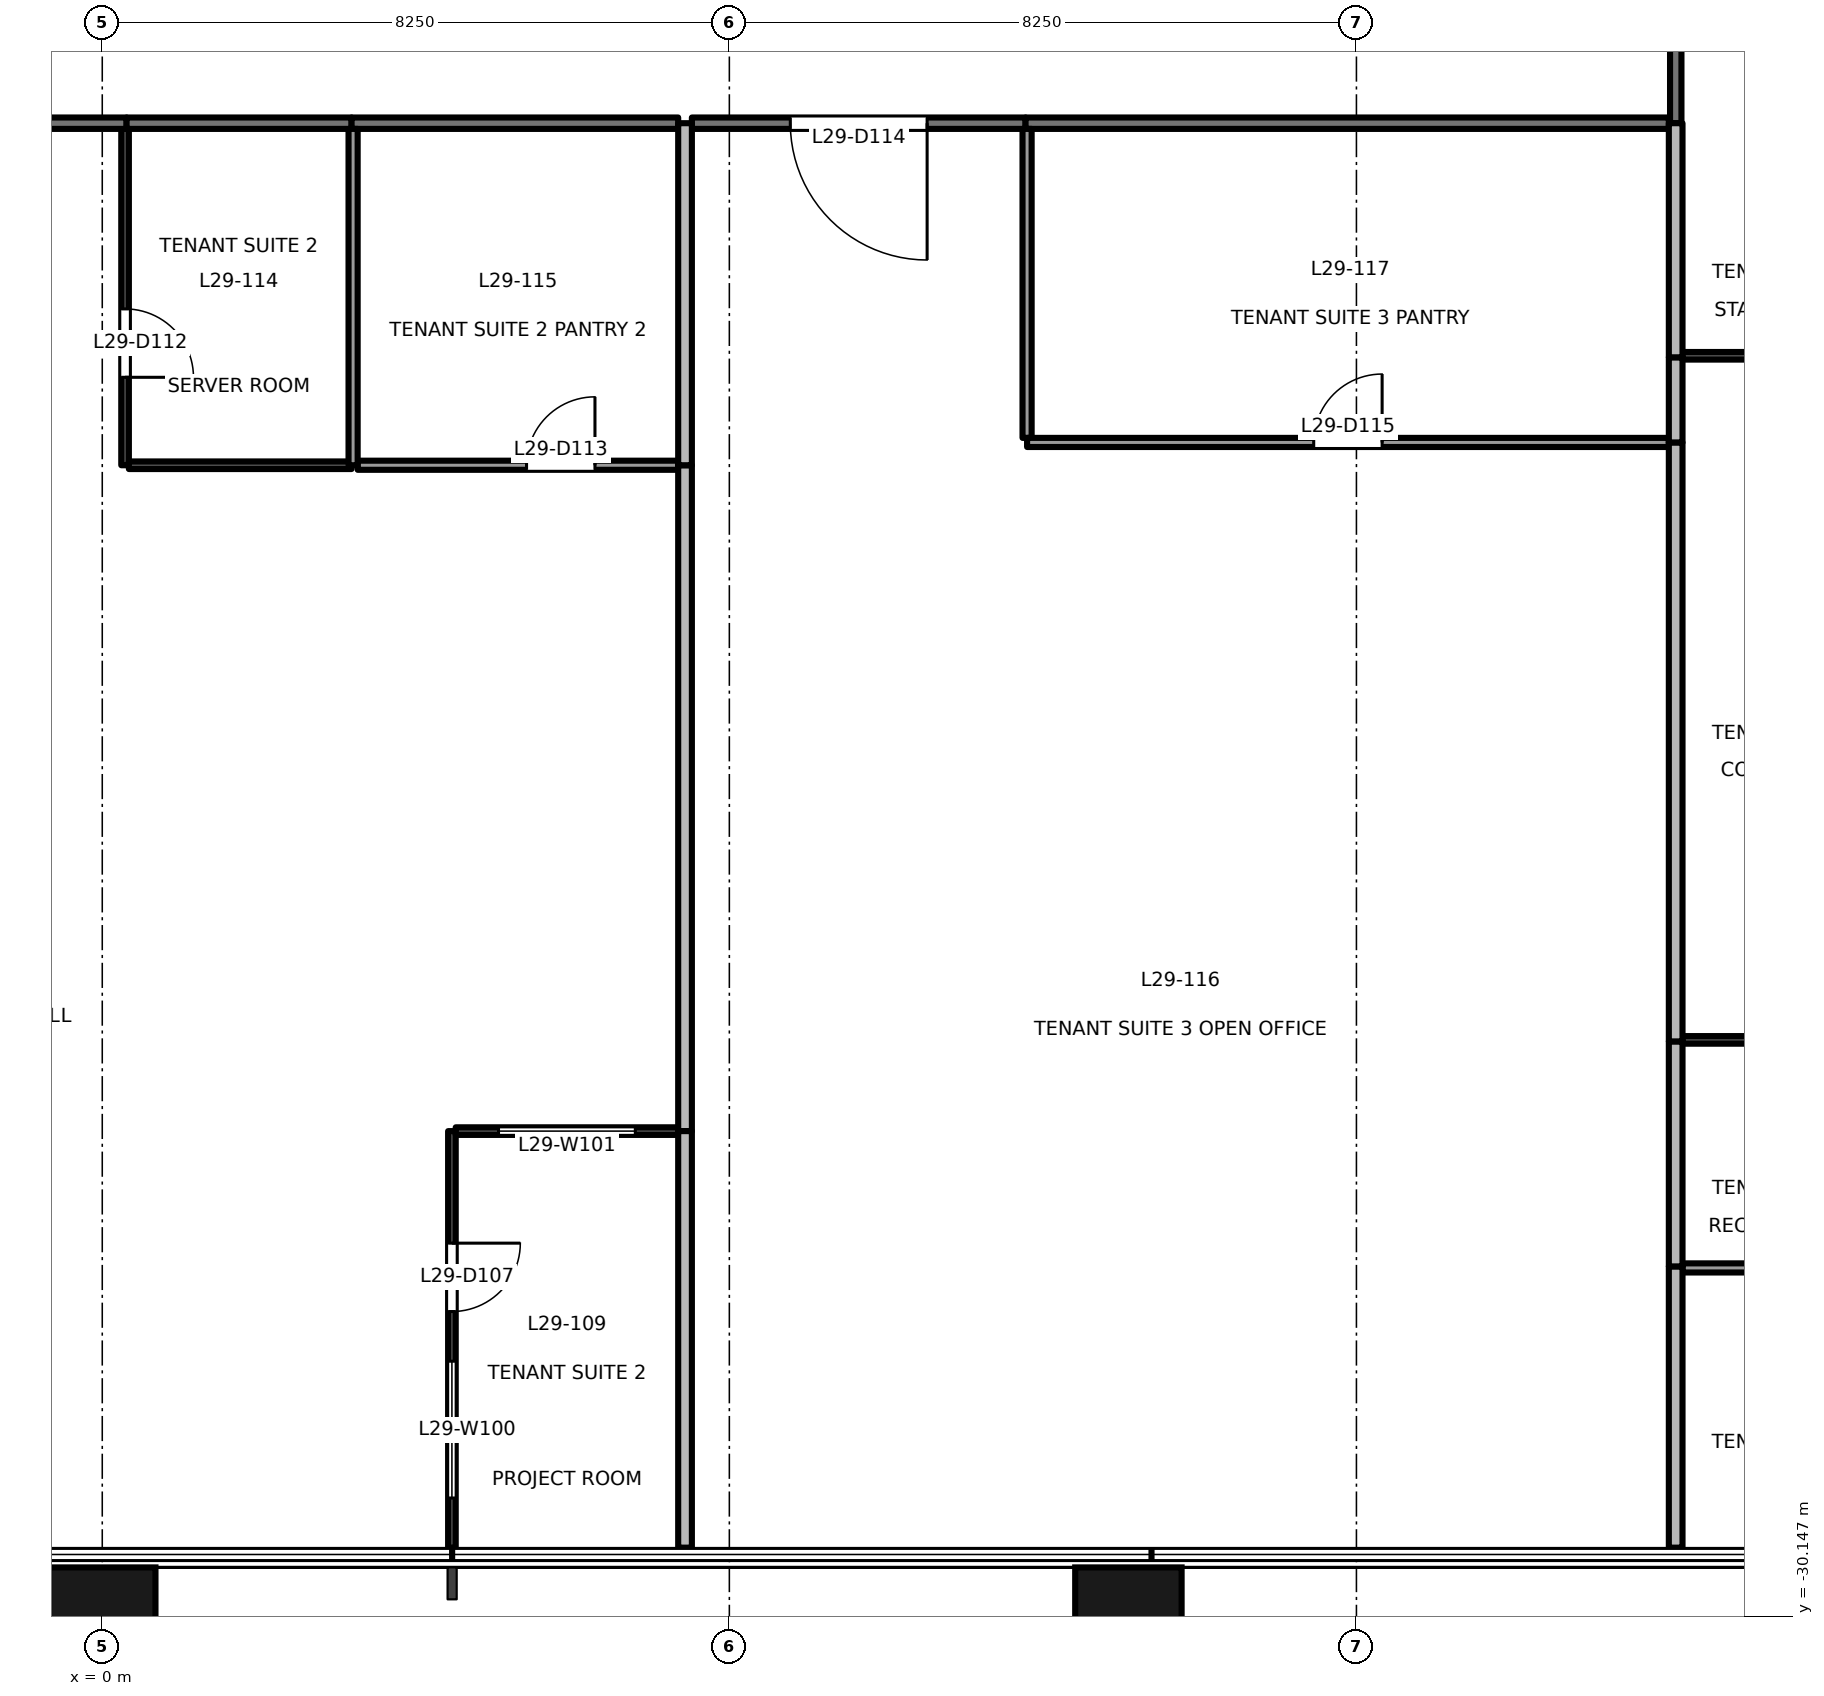
"""IFC4 building model, lengths in metres.
Left out: names, types, materials, properties, quantities, classifications, styles, units other than length and angle.
Written with IfcOpenShell. Run it as: python <this file> out.ifc"""

import sys

from ifc_helpers import new_model, si_unit, direction, frame, frame_2d, origin, origin_2d, place, context, subcontext, project, spatial, rectangle, extrude, element, fill, save


model = new_model("IFC4")
c1 = context("Model", 3, precision=1e-05, world=origin(), true_north=direction((0.0, 1.0)))
c2 = subcontext(c1, "Body", "Model", "MODEL_VIEW")
j1 = project(units=[si_unit("LENGTHUNIT", "METRE"), si_unit("PLANEANGLEUNIT", "RADIAN")], contexts=[c1])
p1 = place(None, origin())
s1 = spatial("IfcSite", under=j1, at=p1, CompositionType="ELEMENT")
p2 = place(p1, origin())
s2 = spatial("IfcBuilding", under=s1, at=p2, CompositionType="ELEMENT")
p3 = place(p2, frame((0.0, 0.0, 130.1)))
s3 = spatial("IfcBuildingStorey", under=s2, at=p3, CompositionType="ELEMENT", Elevation=130.1)
for number, where, z_axis, x_axis in (
    (1, (0.0, -30.4, -0.2), (0.0, 0.0, 1.0), (1.0, 0.0, 0.0)),
    (2, (13.5, -30.4, -0.2), (0.0, 0.0, 1.0), (1.0, 0.0, 0.0)),
):
    element("IfcColumn", number, at=place(p3, frame(where, z_axis=z_axis, x_axis=x_axis)), inside=s3, PredefinedType="COLUMN", context=c2, shape_type="SweptSolid", body=[
        extrude(rectangle(XDim=1.4, YDim=1.8, at=origin_2d()), origin(), (0.0, 0.0, 1.0), 4.0),
    ])
p4 = place(p3, frame((0.32, -10.5, 0.0), z_axis=(0.0, 0.0, 1.0), x_axis=(-1.0, 0.0, 0.0)))
e3 = element("IfcWall", 3, at=p4, inside=s3, PredefinedType="PARTITIONING", context=c2, shape_type="SweptSolid", body=[
    extrude(rectangle(XDim=6.04, YDim=0.15, at=frame_2d((3.02, 0.0))), origin(), (0.0, 0.0, 1.0), 2.9),
])
p5 = place(p4, frame((2.12, 0.0, 0.0)))
e4 = element("IfcOpeningElement", 4, at=p5, cuts=e3, PredefinedType="OPENING", context=c2, shape_type="SweptSolid", body=[
    extrude(rectangle(XDim=1.8, YDim=2.1, at=frame_2d((0.9, 1.05))), frame((0.0, 0.085, 0.0), z_axis=(0.0, -1.0, 0.0), x_axis=(1.0, 0.0, 0.0)), (0.0, 0.0, 1.0), 0.171),
])
p6 = place(p3, frame((3.28, -10.5, 0.0), z_axis=(0.0, 0.0, 1.0), x_axis=(-1.0, 0.0, 0.0)))
e5 = element("IfcWall", 5, at=p6, inside=s3, PredefinedType="PARTITIONING", context=c2, shape_type="SweptSolid", body=[
    extrude(rectangle(XDim=2.96, YDim=0.15, at=frame_2d((1.48, 0.0))), origin(), (0.0, 0.0, 1.0), 3.8),
])
p7 = place(p3, frame((7.577, -10.5, 0.0), z_axis=(0.0, 0.0, 1.0), x_axis=(-1.0, 0.0, 0.0)))
e6 = element("IfcWall", 6, at=p7, inside=s3, PredefinedType="PARTITIONING", context=c2, shape_type="SweptSolid", body=[
    extrude(rectangle(XDim=4.297, YDim=0.15, at=frame_2d((2.148, 0.0))), origin(), (0.0, 0.0, 1.0), 2.9),
])
p8 = place(p3, frame((12.147, -10.5, 0.0), z_axis=(0.0, 0.0, 1.0), x_axis=(-1.0, 0.0, 0.0)))
e7 = element("IfcWall", 7, at=p8, inside=s3, PredefinedType="PARTITIONING", context=c2, shape_type="SweptSolid", body=[
    extrude(rectangle(XDim=4.39, YDim=0.15, at=frame_2d((2.195, 0.0))), origin(), (0.0, 0.0, 1.0), 2.9),
])
p9 = place(p8, frame((1.295, 0.0, 0.0)))
e8 = element("IfcOpeningElement", 8, at=p9, cuts=e7, PredefinedType="OPENING", context=c2, shape_type="SweptSolid", body=[
    extrude(rectangle(XDim=1.8, YDim=2.1, at=frame_2d((0.9, 1.05))), frame((0.0, 0.085, 0.0), z_axis=(0.0, -1.0, 0.0), x_axis=(1.0, 0.0, 0.0)), (0.0, 0.0, 1.0), 0.171),
])
p10 = place(p3, frame((20.61, -10.5, 0.0), z_axis=(0.0, 0.0, 1.0), x_axis=(-1.0, 0.0, 0.0)))
e9 = element("IfcWall", 9, at=p10, inside=s3, PredefinedType="PARTITIONING", context=c2, shape_type="SweptSolid", body=[
    extrude(rectangle(XDim=8.463, YDim=0.15, at=frame_2d((4.231, 0.0))), origin(), (0.0, 0.0, 1.0), 2.9),
])
p11 = place(p3, frame((20.701, -8.18, 0.0), z_axis=(0.0, 0.0, 1.0), x_axis=(0.0, -1.0, 0.0)))
e10 = element("IfcWall", 10, at=p11, inside=s3, PredefinedType="PARTITIONING", context=c2, shape_type="SweptSolid", body=[
    extrude(rectangle(XDim=2.32, YDim=0.15, at=frame_2d((1.16, 0.0))), origin(), (0.0, 0.0, 1.0), 3.8),
])
p12 = place(p3, frame((4.6, -23.76, 0.0), z_axis=(0.0, 0.0, 1.0), x_axis=(0.0, -1.0, 0.0)))
e11 = element("IfcWall", 11, at=p12, inside=s3, PredefinedType="PARTITIONING", context=c2, shape_type="SweptSolid", body=[
    extrude(rectangle(XDim=5.48, YDim=0.1, at=frame_2d((2.74, 0.0))), origin(), (0.0, 0.0, 1.0), 2.9),
])
p13 = place(p12, frame((1.474, 0.0, 0.0)))
e12 = element("IfcOpeningElement", 12, at=p13, cuts=e11, PredefinedType="OPENING", context=c2, shape_type="SweptSolid", body=[
    extrude(rectangle(XDim=0.9, YDim=2.1, at=frame_2d((0.45, 1.05))), frame((0.0, 0.061, 0.0), z_axis=(0.0, -1.0, 0.0), x_axis=(1.0, 0.0, 0.0)), (0.0, 0.0, 1.0), 0.121),
])
p14 = place(p12, frame((3.027, 0.0, 0.9)))
e13 = element("IfcOpeningElement", 13, at=p14, cuts=e11, PredefinedType="OPENING", context=c2, shape_type="SweptSolid", body=[
    extrude(rectangle(XDim=1.8, YDim=1.2, at=frame_2d((0.9, 0.6))), frame((0.0, 0.061, 0.0), z_axis=(0.0, -1.0, 0.0), x_axis=(1.0, 0.0, 0.0)), (0.0, 0.0, 1.0), 0.121),
])
p15 = place(p3, frame((7.577, -23.76, 0.0), z_axis=(0.0, 0.0, 1.0), x_axis=(-1.0, 0.0, 0.0)))
e14 = element("IfcWall", 14, at=p15, inside=s3, PredefinedType="PARTITIONING", context=c2, shape_type="SweptSolid", body=[
    extrude(rectangle(XDim=2.927, YDim=0.1, at=frame_2d((1.463, 0.0))), origin(), (0.0, 0.0, 1.0), 2.9),
])
p16 = place(p15, frame((0.564, 0.0, 0.9)))
e15 = element("IfcOpeningElement", 15, at=p16, cuts=e14, PredefinedType="OPENING", context=c2, shape_type="SweptSolid", body=[
    extrude(rectangle(XDim=1.8, YDim=1.2, at=frame_2d((0.9, 0.6))), frame((0.0, 0.061, 0.0), z_axis=(0.0, -1.0, 0.0), x_axis=(1.0, 0.0, 0.0)), (0.0, 0.0, 1.0), 0.121),
])
p17 = place(p3, frame((0.3, -10.575, 0.0), z_axis=(0.0, 0.0, 1.0), x_axis=(0.0, -1.0, 0.0)))
e16 = element("IfcWall", 16, at=p17, inside=s3, PredefinedType="PARTITIONING", context=c2, shape_type="SweptSolid", body=[
    extrude(rectangle(XDim=4.425, YDim=0.1, at=frame_2d((2.212, 0.0))), origin(), (0.0, 0.0, 1.0), 3.8),
])
p18 = place(p17, frame((2.368, 0.0, 0.0)))
e17 = element("IfcOpeningElement", 17, at=p18, cuts=e16, PredefinedType="OPENING", context=c2, shape_type="SweptSolid", body=[
    extrude(rectangle(XDim=0.9, YDim=2.1, at=frame_2d((0.45, 1.05))), frame((0.0, 0.061, 0.0), z_axis=(0.0, -1.0, 0.0), x_axis=(1.0, 0.0, 0.0)), (0.0, 0.0, 1.0), 0.121),
])
p19 = place(p3, frame((0.35, -15.0, 0.0), z_axis=(0.0, 0.0, 1.0), x_axis=(1.0, 0.0, 0.0)))
e18 = element("IfcWall", 18, at=p19, inside=s3, PredefinedType="PARTITIONING", context=c2, shape_type="SweptSolid", body=[
    extrude(rectangle(XDim=2.93, YDim=0.1, at=frame_2d((1.465, 0.0))), origin(), (0.0, 0.0, 1.0), 3.8),
])
p20 = place(p3, frame((3.36, -15.0, 0.0), z_axis=(0.0, 0.0, 1.0), x_axis=(1.0, 0.0, 0.0)))
e19 = element("IfcWall", 19, at=p20, inside=s3, PredefinedType="PARTITIONING", context=c2, shape_type="SweptSolid", body=[
    extrude(rectangle(XDim=4.217, YDim=0.12, at=frame_2d((2.108, 0.0))), origin(), (0.0, 0.0, 1.0), 2.9),
])
p21 = place(p20, frame((2.222, 0.0, 0.0)))
e20 = element("IfcOpeningElement", 20, at=p21, cuts=e19, PredefinedType="OPENING", context=c2, shape_type="SweptSolid", body=[
    extrude(rectangle(XDim=0.9, YDim=2.1, at=frame_2d((0.45, 1.05))), frame((0.0, 0.071, 0.0), z_axis=(0.0, -1.0, 0.0), x_axis=(1.0, 0.0, 0.0)), (0.0, 0.0, 1.0), 0.141),
])
p22 = place(p3, frame((7.667, -15.0, 0.0), z_axis=(0.0, 0.0, 1.0), x_axis=(0.0, -1.0, 0.0)))
e21 = element("IfcWall", 21, at=p22, inside=s3, PredefinedType="PARTITIONING", context=c2, shape_type="SweptSolid", body=[
    extrude(rectangle(XDim=8.76, YDim=0.18, at=frame_2d((4.38, 0.0))), origin(), (0.0, 0.0, 1.0), 3.8),
])
p23 = place(p3, frame((7.667, -23.76, 0.0), z_axis=(0.0, 0.0, 1.0), x_axis=(0.0, -1.0, 0.0)))
e22 = element("IfcWall", 22, at=p23, inside=s3, PredefinedType="PARTITIONING", context=c2, shape_type="SweptSolid", body=[
    extrude(rectangle(XDim=5.48, YDim=0.18, at=frame_2d((2.74, 0.0))), origin(), (0.0, 0.0, 1.0), 3.8),
])
p24 = place(p3, frame((3.3, -10.575, 0.0), z_axis=(0.0, 0.0, 1.0), x_axis=(0.0, -1.0, 0.0)))
e23 = element("IfcWall", 23, at=p24, inside=s3, PredefinedType="PARTITIONING", context=c2, shape_type="SweptSolid", body=[
    extrude(rectangle(XDim=4.425, YDim=0.12, at=frame_2d((2.212, 0.0))), origin(), (0.0, 0.0, 1.0), 3.8),
])
p25 = place(p3, frame((7.667, -10.5, 0.0), z_axis=(0.0, 0.0, 1.0), x_axis=(0.0, -1.0, 0.0)))
e24 = element("IfcWall", 24, at=p25, inside=s3, PredefinedType="PARTITIONING", context=c2, shape_type="SweptSolid", body=[
    extrude(rectangle(XDim=4.5, YDim=0.18, at=frame_2d((2.25, 0.0))), origin(), (0.0, 0.0, 1.0), 3.8),
])
p26 = place(p3, frame((12.167, -10.575, 0.0), z_axis=(0.0, 0.0, 1.0), x_axis=(0.0, -1.0, 0.0)))
e25 = element("IfcWall", 25, at=p26, inside=s3, PredefinedType="PARTITIONING", context=c2, shape_type="SweptSolid", body=[
    extrude(rectangle(XDim=4.065, YDim=0.12, at=frame_2d((2.032, 0.0))), origin(), (0.0, 0.0, 1.0), 3.8),
])
p27 = place(p3, frame((12.167, -14.7, 0.0), z_axis=(0.0, 0.0, 1.0), x_axis=(1.0, 0.0, 0.0)))
e26 = element("IfcWall", 26, at=p27, inside=s3, PredefinedType="PARTITIONING", context=c2, shape_type="SweptSolid", body=[
    extrude(rectangle(XDim=8.443, YDim=0.12, at=frame_2d((4.222, 0.0))), origin(), (0.0, 0.0, 1.0), 2.9),
])
p28 = place(p27, frame((3.771, 0.0, 0.0)))
e27 = element("IfcOpeningElement", 27, at=p28, cuts=e26, PredefinedType="OPENING", context=c2, shape_type="SweptSolid", body=[
    extrude(rectangle(XDim=0.9, YDim=2.1, at=frame_2d((0.45, 1.05))), frame((0.0, 0.071, 0.0), z_axis=(0.0, -1.0, 0.0), x_axis=(1.0, 0.0, 0.0)), (0.0, 0.0, 1.0), 0.141),
])
p29 = place(p3, frame((20.7, -25.54, 0.0), z_axis=(0.0, 0.0, 1.0), x_axis=(0.0, -1.0, 0.0)))
e28 = element("IfcWall", 28, at=p29, inside=s3, PredefinedType="PARTITIONING", context=c2, shape_type="SweptSolid", body=[
    extrude(rectangle(XDim=3.7, YDim=0.18, at=frame_2d((1.85, 0.0))), origin(), (0.0, 0.0, 1.0), 3.8),
])
p30 = place(p3, frame((20.7, -22.58, 0.0), z_axis=(0.0, 0.0, 1.0), x_axis=(0.0, -1.0, 0.0)))
e29 = element("IfcWall", 29, at=p30, inside=s3, PredefinedType="PARTITIONING", context=c2, shape_type="SweptSolid", body=[
    extrude(rectangle(XDim=2.96, YDim=0.18, at=frame_2d((1.48, 0.0))), origin(), (0.0, 0.0, 1.0), 3.8),
])
p31 = place(p3, frame((20.7, -14.7, 0.0), z_axis=(0.0, 0.0, 1.0), x_axis=(0.0, -1.0, 0.0)))
e30 = element("IfcWall", 30, at=p31, inside=s3, PredefinedType="PARTITIONING", context=c2, shape_type="SweptSolid", body=[
    extrude(rectangle(XDim=7.88, YDim=0.18, at=frame_2d((3.94, 0.0))), origin(), (0.0, 0.0, 1.0), 3.8),
])
p32 = place(p3, frame((20.7, -13.58, 0.0), z_axis=(0.0, 0.0, 1.0), x_axis=(0.0, -1.0, 0.0)))
e31 = element("IfcWall", 31, at=p32, inside=s3, PredefinedType="PARTITIONING", context=c2, shape_type="SweptSolid", body=[
    extrude(rectangle(XDim=1.12, YDim=0.18, at=frame_2d((0.56, 0.0))), origin(), (0.0, 0.0, 1.0), 3.8),
])
p33 = place(p3, frame((20.7, -10.5, 0.0), z_axis=(0.0, 0.0, 1.0), x_axis=(0.0, -1.0, 0.0)))
e32 = element("IfcWall", 32, at=p33, inside=s3, PredefinedType="PARTITIONING", context=c2, shape_type="SweptSolid", body=[
    extrude(rectangle(XDim=3.08, YDim=0.18, at=frame_2d((1.54, 0.0))), origin(), (0.0, 0.0, 1.0), 3.8),
])
p34 = place(p3, frame((20.79, -25.56, 0.0), z_axis=(0.0, 0.0, 1.0), x_axis=(1.0, 0.0, 0.0)))
e33 = element("IfcWall", 33, at=p34, inside=s3, PredefinedType="PARTITIONING", context=c2, shape_type="SweptSolid", body=[
    extrude(rectangle(XDim=2.85, YDim=0.12, at=frame_2d((1.425, 0.0))), origin(), (0.0, 0.0, 1.0), 3.8),
])
for number, where, z_axis, x_axis in (
    (34, (20.79, -22.56, 0.0), (0.0, 0.0, 1.0), (1.0, 0.0, 0.0)),
    (35, (20.79, -13.56, 0.0), (0.0, 0.0, 1.0), (1.0, 0.0, 0.0)),
):
    element("IfcWall", number, at=place(p3, frame(where, z_axis=z_axis, x_axis=x_axis)), inside=s3, PredefinedType="PARTITIONING", context=c2, shape_type="SweptSolid", body=[
        extrude(rectangle(XDim=2.86, YDim=0.1, at=frame_2d((1.43, 0.0))), origin(), (0.0, 0.0, 1.0), 3.8),
    ])
p35 = place(p13, origin())
e36 = element("IfcDoor", 36, at=p35, inside=s3, OperationType="SINGLE_SWING_LEFT", PredefinedType="DOOR", context=c2, shape_type="SweptSolid", body=[
    extrude(rectangle(XDim=0.9, YDim=2.1, at=frame_2d((0.45, 1.05))), frame((0.0, 0.025, 0.0), z_axis=(0.0, -1.0, 0.0), x_axis=(1.0, 0.0, 0.0)), (0.0, 0.0, 1.0), 0.05),
])
fill(e12, e36)
p36 = place(p18, origin())
e37 = element("IfcDoor", 37, at=p36, inside=s3, OperationType="SINGLE_SWING_RIGHT", PredefinedType="DOOR", context=c2, shape_type="SweptSolid", body=[
    extrude(rectangle(XDim=0.9, YDim=2.1, at=frame_2d((0.45, 1.05))), frame((0.0, 0.025, 0.0), z_axis=(0.0, -1.0, 0.0), x_axis=(1.0, 0.0, 0.0)), (0.0, 0.0, 1.0), 0.05),
])
fill(e17, e37)
p37 = place(p21, origin())
e38 = element("IfcDoor", 38, at=p37, inside=s3, OperationType="SINGLE_SWING_RIGHT", PredefinedType="DOOR", context=c2, shape_type="SweptSolid", body=[
    extrude(rectangle(XDim=0.9, YDim=2.1, at=frame_2d((0.45, 1.05))), frame((0.0, 0.025, 0.0), z_axis=(0.0, -1.0, 0.0), x_axis=(1.0, 0.0, 0.0)), (0.0, 0.0, 1.0), 0.05),
])
fill(e20, e38)
p38 = place(p9, origin())
e39 = element("IfcDoor", 39, at=p38, inside=s3, OperationType="DOUBLE_DOOR_SINGLE_SWING", PredefinedType="DOOR", context=c2, shape_type="SweptSolid", body=[
    extrude(rectangle(XDim=1.8, YDim=2.1, at=frame_2d((0.9, 1.05))), frame((0.0, 0.025, 0.0), z_axis=(0.0, -1.0, 0.0), x_axis=(1.0, 0.0, 0.0)), (0.0, 0.0, 1.0), 0.05),
])
fill(e8, e39)
p39 = place(p28, origin())
e40 = element("IfcDoor", 40, at=p39, inside=s3, OperationType="SINGLE_SWING_RIGHT", PredefinedType="DOOR", context=c2, shape_type="SweptSolid", body=[
    extrude(rectangle(XDim=0.9, YDim=2.1, at=frame_2d((0.45, 1.05))), frame((0.0, 0.025, 0.0), z_axis=(0.0, -1.0, 0.0), x_axis=(1.0, 0.0, 0.0)), (0.0, 0.0, 1.0), 0.05),
])
fill(e27, e40)
p40 = place(p14, origin())
e41 = element("IfcWindow", 41, at=p40, inside=s3, PartitioningType="SINGLE_PANEL", PredefinedType="WINDOW", context=c2, shape_type="SweptSolid", body=[
    extrude(rectangle(XDim=1.8, YDim=1.2, at=frame_2d((0.9, 0.6))), frame((0.0, 0.03, 0.0), z_axis=(0.0, -1.0, 0.0), x_axis=(1.0, 0.0, 0.0)), (0.0, 0.0, 1.0), 0.06),
])
fill(e13, e41)
p41 = place(p16, origin())
e42 = element("IfcWindow", 42, at=p41, inside=s3, PartitioningType="SINGLE_PANEL", PredefinedType="WINDOW", context=c2, shape_type="SweptSolid", body=[
    extrude(rectangle(XDim=1.8, YDim=1.2, at=frame_2d((0.9, 0.6))), frame((0.0, 0.03, 0.0), z_axis=(0.0, -1.0, 0.0), x_axis=(1.0, 0.0, 0.0)), (0.0, 0.0, 1.0), 0.06),
])
fill(e15, e42)
save(model, sys.argv[1])
